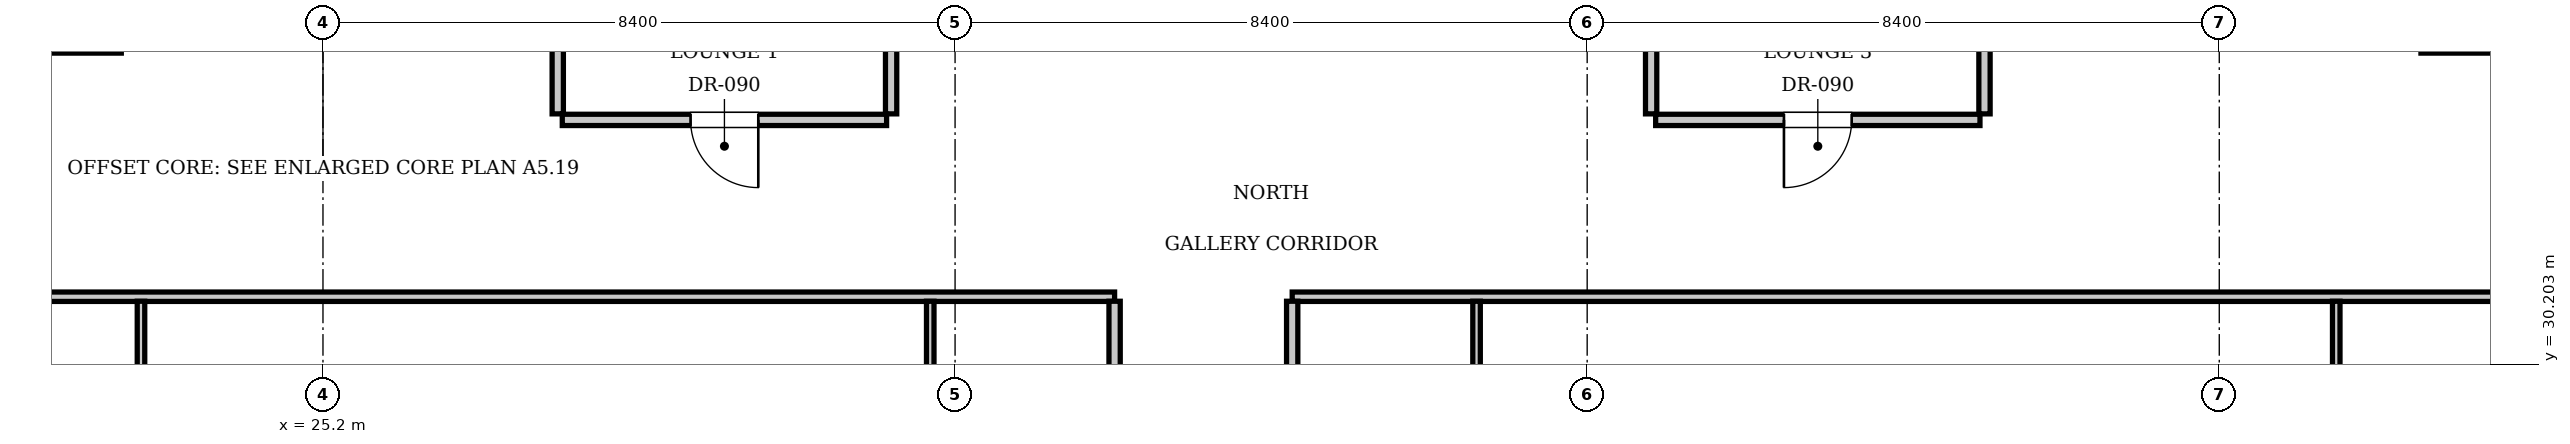
"""IFC4 building model, lengths in metres.
Left out: names, types, materials, properties, quantities, classifications, styles, units other than length and angle.
Written with IfcOpenShell. Run it as: python <this file> out.ifc"""

import sys

from ifc_helpers import new_model, si_unit, direction, frame, frame_2d, origin, place, context, subcontext, project, spatial, rectangle, extrude, element, fill, save


model = new_model("IFC4")
c1 = context("Model", 3, precision=1e-05, world=origin(), true_north=direction((0.0, 1.0)))
c2 = subcontext(c1, "Body", "Model", "MODEL_VIEW")
j1 = project(units=[si_unit("LENGTHUNIT", "METRE"), si_unit("PLANEANGLEUNIT", "RADIAN")], contexts=[c1])
p1 = place(None, origin())
s1 = spatial("IfcSite", under=j1, at=p1, CompositionType="ELEMENT")
p2 = place(p1, origin())
s2 = spatial("IfcBuilding", under=s1, at=p2, CompositionType="ELEMENT")
p3 = place(p2, frame((0.0, 0.0, 192.85)))
s3 = spatial("IfcBuildingStorey", under=s2, at=p3, CompositionType="ELEMENT", Elevation=192.85)
for number, where, z_axis, x_axis in (
    (1, (28.32, 33.53, 0.0), (0.0, 0.0, 1.0), (0.0, 1.0, 0.0)),
    (2, (32.75, 33.53, 0.0), (0.0, 0.0, 1.0), (0.0, 1.0, 0.0)),
):
    element("IfcWall", number, at=place(p3, frame(where, z_axis=z_axis, x_axis=x_axis)), inside=s3, PredefinedType="PARTITIONING", context=c2, shape_type="SweptSolid", body=[
        extrude(rectangle(XDim=2.59, YDim=0.15, at=frame_2d((1.295, 0.0))), origin(), (0.0, 0.0, 1.0), 3.61),
    ])
p4 = place(p3, frame((28.38, 33.45, 0.0), z_axis=(0.0, 0.0, 1.0), x_axis=(1.0, 0.0, 0.0)))
e3 = element("IfcWall", 3, at=p4, inside=s3, PredefinedType="PARTITIONING", context=c2, shape_type="SweptSolid", body=[
    extrude(rectangle(XDim=4.31, YDim=0.15, at=frame_2d((2.155, 0.0))), origin(), (0.0, 0.0, 1.0), 3.61),
])
p5 = place(p4, frame((1.705, 0.0, 0.0)))
e4 = element("IfcOpeningElement", 4, at=p5, cuts=e3, PredefinedType="OPENING", context=c2, shape_type="SweptSolid", body=[
    extrude(rectangle(XDim=0.9, YDim=2.1, at=frame_2d((0.45, 1.05))), frame((0.0, 0.085, 0.0), z_axis=(0.0, -1.0, 0.0), x_axis=(1.0, 0.0, 0.0)), (0.0, 0.0, 1.0), 0.17),
])
for number, where, z_axis, x_axis in (
    (5, (42.85, 33.53, 0.0), (0.0, 0.0, 1.0), (0.0, 1.0, 0.0)),
    (6, (47.28, 33.53, 0.0), (0.0, 0.0, 1.0), (0.0, 1.0, 0.0)),
):
    element("IfcWall", number, at=place(p3, frame(where, z_axis=z_axis, x_axis=x_axis)), inside=s3, PredefinedType="PARTITIONING", context=c2, shape_type="SweptSolid", body=[
        extrude(rectangle(XDim=2.59, YDim=0.15, at=frame_2d((1.295, 0.0))), origin(), (0.0, 0.0, 1.0), 3.61),
    ])
p6 = place(p3, frame((42.91, 33.45, 0.0), z_axis=(0.0, 0.0, 1.0), x_axis=(1.0, 0.0, 0.0)))
e7 = element("IfcWall", 7, at=p6, inside=s3, PredefinedType="PARTITIONING", context=c2, shape_type="SweptSolid", body=[
    extrude(rectangle(XDim=4.31, YDim=0.15, at=frame_2d((2.155, 0.0))), origin(), (0.0, 0.0, 1.0), 3.61),
])
p7 = place(p6, frame((1.705, 0.0, 0.0)))
e8 = element("IfcOpeningElement", 8, at=p7, cuts=e7, PredefinedType="OPENING", context=c2, shape_type="SweptSolid", body=[
    extrude(rectangle(XDim=0.9, YDim=2.1, at=frame_2d((0.45, 1.05))), frame((0.0, 0.085, 0.0), z_axis=(0.0, -1.0, 0.0), x_axis=(1.0, 0.0, 0.0)), (0.0, 0.0, 1.0), 0.17),
])
p8 = place(p3, frame((13.2, 31.1, 0.0), z_axis=(0.0, 0.0, 1.0), x_axis=(1.0, 0.0, 0.0)))
e9 = element("IfcWall", 9, at=p8, inside=s3, PredefinedType="PARTITIONING", context=c2, shape_type="SweptSolid", body=[
    extrude(rectangle(XDim=22.52, YDim=0.125, at=frame_2d((11.26, 0.0))), origin(), (0.0, 0.0, 1.0), 3.61),
])
p9 = place(p3, frame((38.08, 31.1, 0.0), z_axis=(0.0, 0.0, 1.0), x_axis=(1.0, 0.0, 0.0)))
e10 = element("IfcWall", 10, at=p9, inside=s3, PredefinedType="PARTITIONING", context=c2, shape_type="SweptSolid", body=[
    extrude(rectangle(XDim=24.32, YDim=0.125, at=frame_2d((12.16, 0.0))), origin(), (0.0, 0.0, 1.0), 3.61),
])
p10 = place(p3, frame((35.72, 29.15, 0.0), z_axis=(0.0, 0.0, 1.0), x_axis=(0.0, 1.0, 0.0)))
e11 = element("IfcWall", 11, at=p10, inside=s3, PredefinedType="PARTITIONING", context=c2, shape_type="SweptSolid", body=[
    extrude(rectangle(XDim=1.89, YDim=0.15, at=frame_2d((0.945, 0.0))), origin(), (0.0, 0.0, 1.0), 3.61),
])
p11 = place(p3, frame((33.27, 29.15, 0.0), z_axis=(0.0, 0.0, 1.0), x_axis=(0.0, 1.0, 0.0)))
e12 = element("IfcWall", 12, at=p11, inside=s3, PredefinedType="PARTITIONING", context=c2, shape_type="SweptSolid", body=[
    extrude(rectangle(XDim=1.89, YDim=0.1, at=frame_2d((0.945, 0.0))), origin(), (0.0, 0.0, 1.0), 3.61),
])
p12 = place(p3, frame((22.781, 27.46, 0.0), z_axis=(0.0, 0.0, 1.0), x_axis=(0.0, 1.0, 0.0)))
e13 = element("IfcWall", 13, at=p12, inside=s3, PredefinedType="PARTITIONING", context=c2, shape_type="SweptSolid", body=[
    extrude(rectangle(XDim=3.58, YDim=0.1, at=frame_2d((1.79, 0.0))), origin(), (0.0, 0.0, 1.0), 3.61),
])
p13 = place(p12, frame((1.34, 0.0, 0.0)))
e14 = element("IfcOpeningElement", 14, at=p13, cuts=e13, PredefinedType="OPENING", context=c2, shape_type="SweptSolid", body=[
    extrude(rectangle(XDim=0.9, YDim=2.1, at=frame_2d((0.45, 1.05))), frame((0.0, 0.06, 0.0), z_axis=(0.0, -1.0, 0.0), x_axis=(1.0, 0.0, 0.0)), (0.0, 0.0, 1.0), 0.12),
])
p14 = place(p3, frame((38.08, 29.15, 0.0), z_axis=(0.0, 0.0, 1.0), x_axis=(0.0, 1.0, 0.0)))
e15 = element("IfcWall", 15, at=p14, inside=s3, PredefinedType="PARTITIONING", context=c2, shape_type="SweptSolid", body=[
    extrude(rectangle(XDim=1.89, YDim=0.15, at=frame_2d((0.945, 0.0))), origin(), (0.0, 0.0, 1.0), 3.61),
])
p15 = place(p3, frame((40.53, 29.15, 0.0), z_axis=(0.0, 0.0, 1.0), x_axis=(0.0, 1.0, 0.0)))
e16 = element("IfcWall", 16, at=p15, inside=s3, PredefinedType="PARTITIONING", context=c2, shape_type="SweptSolid", body=[
    extrude(rectangle(XDim=1.89, YDim=0.1, at=frame_2d((0.945, 0.0))), origin(), (0.0, 0.0, 1.0), 3.61),
])
p16 = place(p3, frame((51.954, 27.46, 0.0), z_axis=(0.0, 0.0, 1.0), x_axis=(0.0, 1.0, 0.0)))
e17 = element("IfcWall", 17, at=p16, inside=s3, PredefinedType="PARTITIONING", context=c2, shape_type="SweptSolid", body=[
    extrude(rectangle(XDim=3.58, YDim=0.1, at=frame_2d((1.79, 0.0))), origin(), (0.0, 0.0, 1.0), 3.61),
])
p17 = place(p16, frame((1.34, 0.0, 0.0)))
e18 = element("IfcOpeningElement", 18, at=p17, cuts=e17, PredefinedType="OPENING", context=c2, shape_type="SweptSolid", body=[
    extrude(rectangle(XDim=0.9, YDim=2.1, at=frame_2d((0.45, 1.05))), frame((0.0, 0.06, 0.0), z_axis=(0.0, -1.0, 0.0), x_axis=(1.0, 0.0, 0.0)), (0.0, 0.0, 1.0), 0.12),
])
p18 = place(p3, frame((13.2, 34.4, 0.0), z_axis=(0.0, 0.0, 1.0), x_axis=(1.0, 0.0, 0.0)))
e19 = element("IfcWall", 19, at=p18, inside=s3, PredefinedType="PARTITIONING", context=c2, shape_type="SweptSolid", body=[
    extrude(rectangle(XDim=9.32, YDim=0.125, at=frame_2d((4.66, 0.0))), origin(), (0.0, 0.0, 1.0), 3.61),
])
p19 = place(p3, frame((53.08, 34.4, 0.0), z_axis=(0.0, 0.0, 1.0), x_axis=(1.0, 0.0, 0.0)))
e20 = element("IfcWall", 20, at=p19, inside=s3, PredefinedType="PARTITIONING", context=c2, shape_type="SweptSolid", body=[
    extrude(rectangle(XDim=9.32, YDim=0.125, at=frame_2d((4.66, 0.0))), origin(), (0.0, 0.0, 1.0), 3.61),
])
p20 = place(p5, frame((0.9, 0.0, 0.0), z_axis=(0.0, 0.0, 1.0), x_axis=(-1.0, 0.0, 0.0)))
e21 = element("IfcDoor", 21, at=p20, inside=s3, OperationType="SINGLE_SWING_LEFT", PredefinedType="DOOR", context=c2, shape_type="SweptSolid", body=[
    extrude(rectangle(XDim=0.9, YDim=2.1, at=frame_2d((0.45, 1.05))), frame((0.0, 0.025, 0.0), z_axis=(0.0, -1.0, 0.0), x_axis=(1.0, 0.0, 0.0)), (0.0, 0.0, 1.0), 0.05),
])
fill(e4, e21)
p21 = place(p7, frame((0.9, 0.0, 0.0), z_axis=(0.0, 0.0, 1.0), x_axis=(-1.0, 0.0, 0.0)))
e22 = element("IfcDoor", 22, at=p21, inside=s3, OperationType="SINGLE_SWING_RIGHT", PredefinedType="DOOR", context=c2, shape_type="SweptSolid", body=[
    extrude(rectangle(XDim=0.9, YDim=2.1, at=frame_2d((0.45, 1.05))), frame((0.0, 0.025, 0.0), z_axis=(0.0, -1.0, 0.0), x_axis=(1.0, 0.0, 0.0)), (0.0, 0.0, 1.0), 0.05),
])
fill(e8, e22)
save(model, sys.argv[1])
